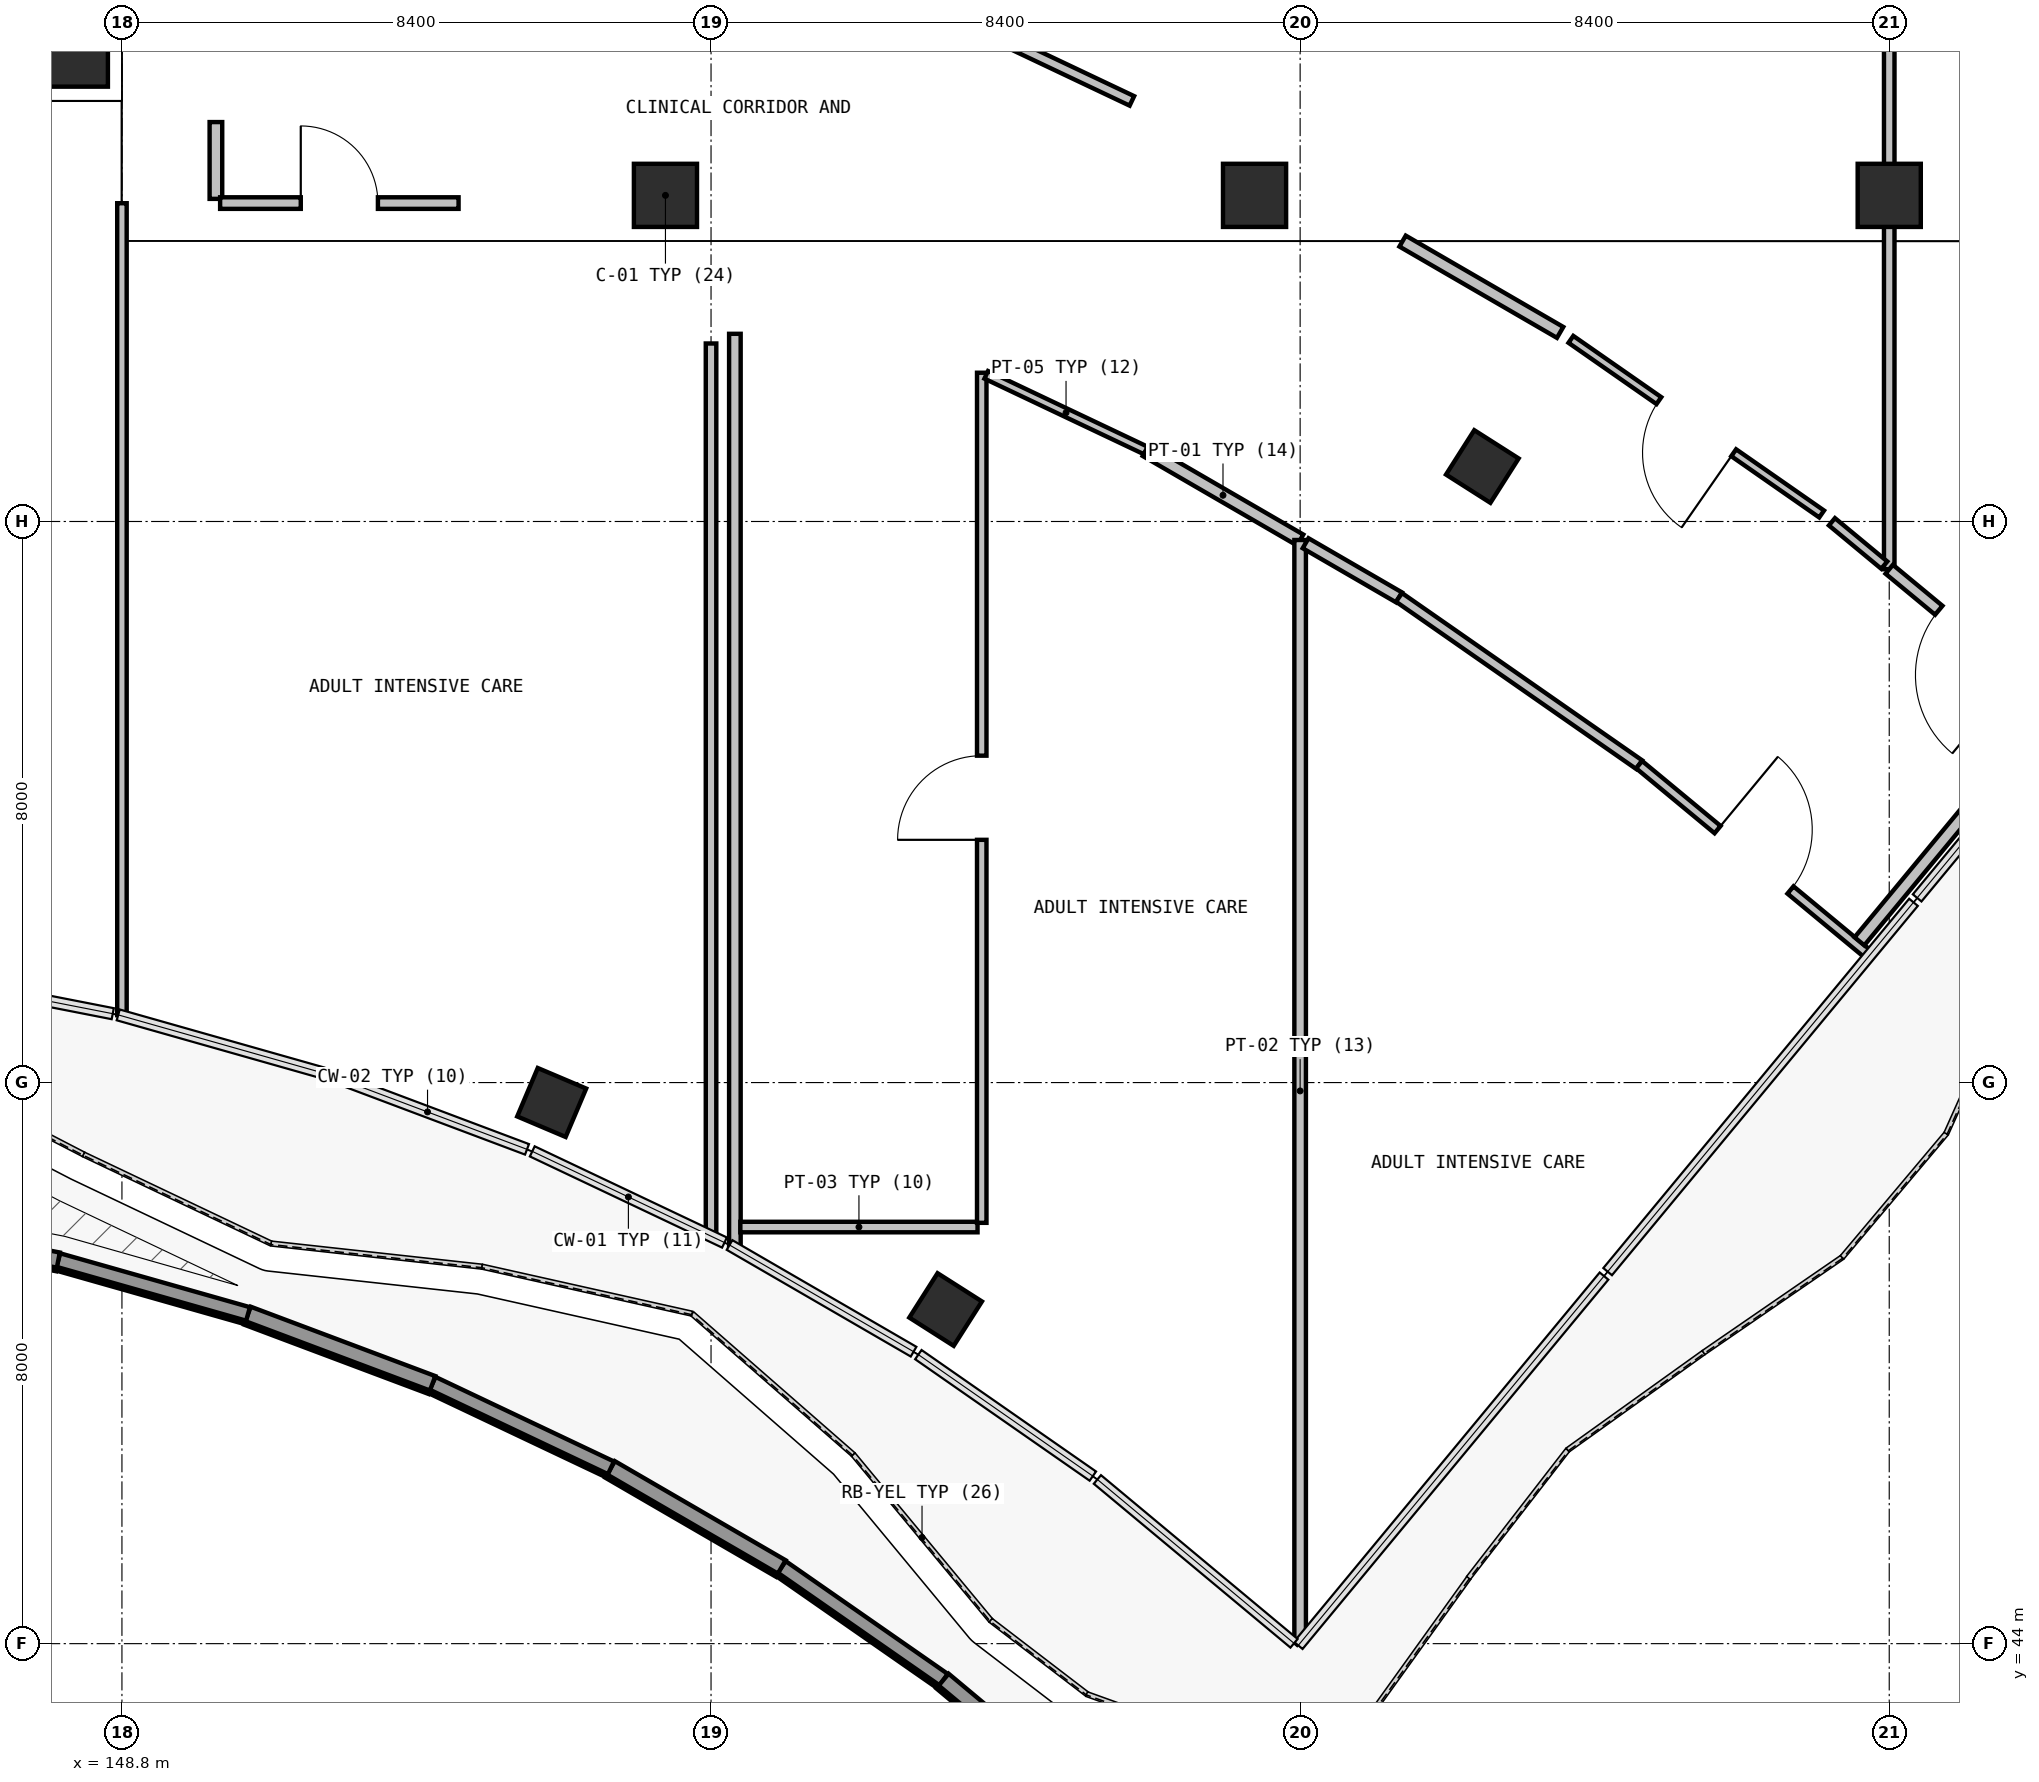
"""IFC4 building model, lengths in metres.
Left out: names, types, materials, properties, quantities, classifications, styles, units other than length and angle.
Written with IfcOpenShell. Run it as: python <this file> out.ifc"""

import sys

from ifc_helpers import new_model, si_unit, direction, frame, frame_2d, origin, origin_2d, place, context, subcontext, project, spatial, rectangle, extrude, element, fill, save


model = new_model("IFC4")
c1 = context("Model", 3, precision=1e-05, world=origin(), true_north=direction((0.0, 1.0)))
c2 = subcontext(c1, "Body", "Model", "MODEL_VIEW")
j1 = project(units=[si_unit("LENGTHUNIT", "METRE"), si_unit("PLANEANGLEUNIT", "RADIAN")], contexts=[c1])
p1 = place(None, origin())
s1 = spatial("IfcSite", under=j1, at=p1, CompositionType="ELEMENT")
p2 = place(p1, origin())
s2 = spatial("IfcBuilding", under=s1, at=p2, CompositionType="ELEMENT")
p3 = place(p2, frame((0.0, 0.0, 5.4)))
s3 = spatial("IfcBuildingStorey", under=s2, at=p3, CompositionType="ELEMENT", Elevation=5.4)
for number, where, z_axis, x_axis in (
    (1, (148.15, 66.65, 0.0), (0.0, 0.0, 1.0), (1.0, 0.0, 0.0)),
    (2, (156.55, 64.65, 0.0), (0.0, 0.0, 1.0), (1.0, 0.0, 0.0)),
    (3, (164.95, 64.65, 0.0), (0.0, 0.0, 1.0), (1.0, 0.0, 0.0)),
    (4, (174.0, 64.65, 0.0), (0.0, 0.0, 1.0), (1.0, 0.0, 0.0)),
):
    element("IfcColumn", number, at=place(p3, frame(where, z_axis=z_axis, x_axis=x_axis)), inside=s3, PredefinedType="COLUMN", context=c2, shape_type="SweptSolid", body=[
        extrude(rectangle(XDim=0.9, YDim=0.9, at=origin_2d()), origin(), (0.0, 0.0, 1.0), 4.8),
    ])
for number, where, z_axis, x_axis in (
    (5, (154.928, 51.716, 0.0), (0.0, 0.0, 1.0), (0.39, 0.921, 0.0)),
    (6, (168.198, 60.784, 0.0), (0.0, 0.0, 1.0), (0.537, 0.844, 0.0)),
    (7, (160.545, 48.764, 0.0), (0.0, 0.0, 1.0), (0.537, 0.844, 0.0)),
):
    element("IfcColumn", number, at=place(p3, frame(where, z_axis=z_axis, x_axis=x_axis)), inside=s3, PredefinedType="COLUMN", context=c2, shape_type="SweptSolid", body=[
        extrude(rectangle(XDim=0.75, YDim=0.75, at=origin_2d()), origin(), (0.0, 0.0, 1.0), 4.8),
    ])
p4 = place(p3, frame((160.517, 43.487, -0.08), z_axis=(0.0, 0.0, 1.0), x_axis=(-0.820802595538, 0.571211956421, 0.0)))
e8 = element("IfcWall", 8, at=p4, inside=s3, PredefinedType="PARAPET", context=c2, shape_type="SweptSolid", body=[
    extrude(rectangle(XDim=2.813, YDim=0.2, at=frame_2d((1.407, 0.0))), origin(), (0.0, 0.0, 1.0), 1.15),
])
p5 = place(p3, frame((158.208, 45.094, -0.08), z_axis=(0.0, 0.0, 1.0), x_axis=(-0.864915249361, 0.501917932956, 0.0)))
e9 = element("IfcWall", 9, at=p5, inside=s3, PredefinedType="PARAPET", context=c2, shape_type="SweptSolid", body=[
    extrude(rectangle(XDim=2.815, YDim=0.22, at=frame_2d((1.408, 0.0))), origin(), (0.0, 0.0, 1.0), 1.15),
])
p6 = place(p3, frame((155.773, 46.507, -0.08), z_axis=(0.0, 0.0, 1.0), x_axis=(-0.903700736415, 0.428164663422, 0.0)))
e10 = element("IfcWall", 10, at=p6, inside=s3, PredefinedType="PARAPET", context=c2, shape_type="SweptSolid", body=[
    extrude(rectangle(XDim=2.814, YDim=0.2, at=frame_2d((1.407, 0.0))), origin(), (0.0, 0.0, 1.0), 1.15),
])
p7 = place(p3, frame((153.23, 47.712, -0.08), z_axis=(0.0, 0.0, 1.0), x_axis=(-0.936097034399, 0.35174186869, 0.0)))
e11 = element("IfcWall", 11, at=p7, inside=s3, PredefinedType="PARAPET", context=c2, shape_type="SweptSolid", body=[
    extrude(rectangle(XDim=2.812, YDim=0.22, at=frame_2d((1.406, 0.0))), origin(), (0.0, 0.0, 1.0), 1.15),
])
p8 = place(p3, frame((150.598, 48.701, -0.08), z_axis=(0.0, 0.0, 1.0), x_axis=(-0.961968291007, 0.273161137603, 0.0)))
e12 = element("IfcWall", 12, at=p8, inside=s3, PredefinedType="PARAPET", context=c2, shape_type="SweptSolid", body=[
    extrude(rectangle(XDim=2.812, YDim=0.2, at=frame_2d((1.406, 0.0))), origin(), (0.0, 0.0, 1.0), 1.15),
])
p9 = place(p3, frame((147.893, 49.469, -0.08), z_axis=(0.0, 0.0, 1.0), x_axis=(-0.981415747177, 0.191893541302, 0.0)))
e13 = element("IfcWall", 13, at=p9, inside=s3, PredefinedType="PARAPET", context=c2, shape_type="SweptSolid", body=[
    extrude(rectangle(XDim=2.814, YDim=0.22, at=frame_2d((1.407, 0.0))), origin(), (0.0, 0.0, 1.0), 1.15),
])
p10 = place(p3, frame((163.183, 41.258, -0.08), z_axis=(0.0, 0.0, 1.0), x_axis=(-0.76718372461, 0.641427418103, 0.0)))
e14 = element("IfcWall", 14, at=p10, inside=s3, PredefinedType="PARAPET", context=c2, shape_type="SweptSolid", body=[
    extrude(rectangle(XDim=3.475, YDim=0.22, at=frame_2d((1.738, 0.0))), origin(), (0.0, 0.0, 1.0), 1.15),
])
p11 = place(p3, frame((148.8, 64.538, 0.0), z_axis=(0.0, 0.0, 1.0), x_axis=(0.0, -1.0, 0.0)))
e15 = element("IfcWall", 15, at=p11, inside=s3, PredefinedType="PARTITIONING", context=c2, shape_type="SweptSolid", body=[
    extrude(rectangle(XDim=11.577, YDim=0.135, at=frame_2d((5.789, 0.0))), origin(), (0.0, 0.0, 1.0), 4.445),
])
p12 = place(p3, frame((150.14, 65.695, 0.0), z_axis=(0.0, 0.0, 1.0), x_axis=(0.0, -1.0, 0.0)))
e16 = element("IfcWall", 16, at=p12, inside=s3, PredefinedType="PARTITIONING", context=c2, shape_type="SweptSolid", body=[
    extrude(rectangle(XDim=1.095, YDim=0.18, at=frame_2d((0.547, 0.0))), origin(), (0.0, 0.0, 1.0), 4.445),
])
p13 = place(p3, frame((150.2, 64.54, 0.0), z_axis=(0.0, 0.0, 1.0), x_axis=(1.0, 0.0, 0.0)))
e17 = element("IfcWall", 17, at=p13, inside=s3, PredefinedType="PARTITIONING", context=c2, shape_type="SweptSolid", body=[
    extrude(rectangle(XDim=3.4, YDim=0.165, at=frame_2d((1.7, 0.0))), origin(), (0.0, 0.0, 1.0), 4.445),
])
p14 = place(p13, frame((1.15, 0.0, 0.0)))
e18 = element("IfcOpeningElement", 18, at=p14, cuts=e17, PredefinedType="OPENING", context=c2, shape_type="SweptSolid", body=[
    extrude(rectangle(XDim=1.1, YDim=2.15, at=frame_2d((0.55, 1.075))), frame((0.0, 0.093, 0.0), z_axis=(0.0, -1.0, 0.0), x_axis=(1.0, 0.0, 0.0)), (0.0, 0.0, 1.0), 0.185),
])
p15 = place(p3, frame((157.2, 62.538, 0.0), z_axis=(0.0, 0.0, 1.0), x_axis=(0.0, -1.0, 0.0)))
e19 = element("IfcWall", 19, at=p15, inside=s3, PredefinedType="PARTITIONING", context=c2, shape_type="SweptSolid", body=[
    extrude(rectangle(XDim=12.715, YDim=0.15, at=frame_2d((6.357, 0.0))), origin(), (0.0, 0.0, 1.0), 4.445),
])
p16 = place(p3, frame((157.54, 62.676, 0.0), z_axis=(0.0, 0.0, 1.0), x_axis=(0.0, -1.0, 0.0)))
e20 = element("IfcWall", 20, at=p16, inside=s3, PredefinedType="PARTITIONING", context=c2, shape_type="SweptSolid", body=[
    extrude(rectangle(XDim=13.023, YDim=0.165, at=frame_2d((6.511, 0.0))), origin(), (0.0, 0.0, 1.0), 4.445),
])
p17 = place(p3, frame((157.618, 49.94, 0.0), z_axis=(0.0, 0.0, 1.0), x_axis=(1.0, 0.0, 0.0)))
e21 = element("IfcWall", 21, at=p17, inside=s3, PredefinedType="PARTITIONING", context=c2, shape_type="SweptSolid", body=[
    extrude(rectangle(XDim=3.382, YDim=0.15, at=frame_2d((1.691, 0.0))), origin(), (0.0, 0.0, 1.0), 4.445),
])
p18 = place(p3, frame((161.06, 50.0, 0.0), z_axis=(0.0, 0.0, 1.0), x_axis=(0.0, 1.0, 0.0)))
e22 = element("IfcWall", 22, at=p18, inside=s3, PredefinedType="PARTITIONING", context=c2, shape_type="SweptSolid", body=[
    extrude(rectangle(XDim=12.121, YDim=0.135, at=frame_2d((6.061, 0.0))), origin(), (0.0, 0.0, 1.0), 4.445),
])
p19 = place(p18, frame((5.461, 0.0, 0.0)))
e23 = element("IfcOpeningElement", 23, at=p19, cuts=e22, PredefinedType="OPENING", context=c2, shape_type="SweptSolid", body=[
    extrude(rectangle(XDim=1.2, YDim=2.15, at=frame_2d((0.6, 1.075))), frame((0.0, 0.077, 0.0), z_axis=(0.0, -1.0, 0.0), x_axis=(1.0, 0.0, 0.0)), (0.0, 0.0, 1.0), 0.155),
])
p20 = place(p3, frame((161.124, 62.091, 0.0), z_axis=(0.0, 0.0, 1.0), x_axis=(0.903575932901, -0.428427979341, 0.0)))
e24 = element("IfcWall", 24, at=p20, inside=s3, PredefinedType="PARTITIONING", context=c2, shape_type="SweptSolid", body=[
    extrude(rectangle(XDim=2.519, YDim=0.12, at=frame_2d((1.259, 0.0))), origin(), (0.0, 0.0, 1.0), 4.445),
])
p21 = place(p3, frame((163.4, 61.012, 0.0), z_axis=(0.0, 0.0, 1.0), x_axis=(0.865071180383, -0.501649133231, 0.0)))
e25 = element("IfcWall", 25, at=p21, inside=s3, PredefinedType="PARTITIONING", context=c2, shape_type="SweptSolid", body=[
    extrude(rectangle(XDim=2.543, YDim=0.18, at=frame_2d((1.272, 0.0))), origin(), (0.0, 0.0, 1.0), 4.445),
])
p22 = place(p3, frame((165.6, 59.736, 0.0), z_axis=(0.0, 0.0, 1.0), x_axis=(0.0, -1.0, 0.0)))
e26 = element("IfcWall", 26, at=p22, inside=s3, PredefinedType="PARTITIONING", context=c2, shape_type="SweptSolid", body=[
    extrude(rectangle(XDim=15.71, YDim=0.165, at=frame_2d((7.855, 0.0))), origin(), (0.0, 0.0, 1.0), 4.445),
])
p23 = place(p3, frame((163.201, 65.997, 0.0), z_axis=(0.0, 0.0, 1.0), x_axis=(-0.903658874167, 0.428253008325, 0.0)))
e27 = element("IfcWall", 27, at=p23, inside=s3, PredefinedType="PARTITIONING", context=c2, shape_type="SweptSolid", body=[
    extrude(rectangle(XDim=1.952, YDim=0.15, at=frame_2d((0.976, 0.0))), origin(), (0.0, 0.0, 1.0), 4.445),
])
p24 = place(p3, frame((165.678, 59.69, 0.0), z_axis=(0.0, 0.0, 1.0), x_axis=(0.865201820635, -0.501423782413, 0.0)))
e28 = element("IfcWall", 28, at=p24, inside=s3, PredefinedType="PARTITIONING", context=c2, shape_type="SweptSolid", body=[
    extrude(rectangle(XDim=1.54, YDim=0.165, at=frame_2d((0.77, 0.0))), origin(), (0.0, 0.0, 1.0), 4.445),
])
p25 = place(p3, frame((167.01, 58.918, 0.0), z_axis=(0.0, 0.0, 1.0), x_axis=(0.820562806153, -0.571556367437, 0.0)))
e29 = element("IfcWall", 29, at=p25, inside=s3, PredefinedType="PARTITIONING", context=c2, shape_type="SweptSolid", body=[
    extrude(rectangle(XDim=4.173, YDim=0.15, at=frame_2d((2.086, 0.0))), origin(), (0.0, 0.0, 1.0), 4.445),
])
p26 = place(p3, frame((170.434, 56.533, 0.0), z_axis=(0.0, 0.0, 1.0), x_axis=(0.770184287696, -0.637821419353, 0.0)))
e30 = element("IfcWall", 30, at=p26, inside=s3, PredefinedType="PARTITIONING", context=c2, shape_type="SweptSolid", body=[
    extrude(rectangle(XDim=4.253, YDim=0.135, at=frame_2d((2.127, 0.0))), origin(), (0.0, 0.0, 1.0), 4.445),
])
p27 = place(p26, frame((1.452, 0.0, 0.0)))
e31 = element("IfcOpeningElement", 31, at=p27, cuts=e30, PredefinedType="OPENING", context=c2, shape_type="SweptSolid", body=[
    extrude(rectangle(XDim=1.35, YDim=2.15, at=frame_2d((0.675, 1.075))), frame((0.0, 0.077, 0.0), z_axis=(0.0, -1.0, 0.0), x_axis=(1.0, 0.0, 0.0)), (0.0, 0.0, 1.0), 0.155),
])
p28 = place(p3, frame((173.036, 60.107, 0.0), z_axis=(0.0, 0.0, 1.0), x_axis=(-0.820574971601, 0.571538901547, 0.0)))
e32 = element("IfcWall", 32, at=p28, inside=s3, PredefinedType="PARTITIONING", context=c2, shape_type="SweptSolid", body=[
    extrude(rectangle(XDim=4.357, YDim=0.12, at=frame_2d((2.178, 0.0))), origin(), (0.0, 0.0, 1.0), 4.445),
])
p29 = place(p28, frame((1.528, 0.0, 0.0)))
e33 = element("IfcOpeningElement", 33, at=p29, cuts=e32, PredefinedType="OPENING", context=c2, shape_type="SweptSolid", body=[
    extrude(rectangle(XDim=1.3, YDim=2.15, at=frame_2d((0.65, 1.075))), frame((0.0, 0.07, 0.0), z_axis=(0.0, -1.0, 0.0), x_axis=(1.0, 0.0, 0.0)), (0.0, 0.0, 1.0), 0.14),
])
p30 = place(p3, frame((169.307, 62.696, 0.0), z_axis=(0.0, 0.0, 1.0), x_axis=(-0.86512994763, 0.501547778097, 0.0)))
e34 = element("IfcWall", 34, at=p30, inside=s3, PredefinedType="PARTITIONING", context=c2, shape_type="SweptSolid", body=[
    extrude(rectangle(XDim=2.596, YDim=0.18, at=frame_2d((1.298, 0.0))), origin(), (0.0, 0.0, 1.0), 4.445),
])
p31 = place(p3, frame((174.0, 77.521, 0.0), z_axis=(0.0, 0.0, 1.0), x_axis=(0.0, -1.0, 0.0)))
e35 = element("IfcWall", 35, at=p31, inside=s3, PredefinedType="PARTITIONING", context=c2, shape_type="SweptSolid", body=[
    extrude(rectangle(XDim=18.202, YDim=0.15, at=frame_2d((9.101, 0.0))), origin(), (0.0, 0.0, 1.0), 3.695),
])
p32 = place(p3, frame((173.929, 59.378, 0.0), z_axis=(0.0, 0.0, 1.0), x_axis=(-0.769933113357, 0.638124596733, 0.0)))
e36 = element("IfcWall", 36, at=p32, inside=s3, PredefinedType="PARTITIONING", context=c2, shape_type="SweptSolid", body=[
    extrude(rectangle(XDim=0.969, YDim=0.135, at=frame_2d((0.484, 0.0))), origin(), (0.0, 0.0, 1.0), 4.445),
])
p33 = place(p3, frame((173.575, 54.014, 0.0), z_axis=(0.0, 0.0, 1.0), x_axis=(0.637654919924, 0.770322142416, 0.0)))
e37 = element("IfcWall", 37, at=p33, inside=s3, PredefinedType="PARTITIONING", context=c2, shape_type="SweptSolid", body=[
    extrude(rectangle(XDim=4.297, YDim=0.18, at=frame_2d((2.148, 0.0))), origin(), (0.0, 0.0, 1.0), 4.445),
])
p34 = place(p3, frame((176.53, 57.225, 0.0), z_axis=(0.0, 0.0, 1.0), x_axis=(-0.770367879737, 0.637599662695, 0.0)))
e38 = element("IfcWall", 38, at=p34, inside=s3, PredefinedType="PARTITIONING", context=c2, shape_type="SweptSolid", body=[
    extrude(rectangle(XDim=3.284, YDim=0.165, at=frame_2d((1.642, 0.0))), origin(), (0.0, 0.0, 1.0), 4.445),
])
p35 = place(p34, frame((0.917, 0.0, 0.0)))
e39 = element("IfcOpeningElement", 39, at=p35, cuts=e38, PredefinedType="OPENING", context=c2, shape_type="SweptSolid", body=[
    extrude(rectangle(XDim=1.45, YDim=2.15, at=frame_2d((0.725, 1.075))), frame((0.0, 0.093, 0.0), z_axis=(0.0, -1.0, 0.0), x_axis=(1.0, 0.0, 0.0)), (0.0, 0.0, 1.0), 0.185),
])
p36 = place(p14, origin())
e40 = element("IfcDoor", 40, at=p36, inside=s3, OperationType="SINGLE_SWING_LEFT", PredefinedType="DOOR", context=c2, shape_type="SweptSolid", body=[
    extrude(rectangle(XDim=1.1, YDim=2.15, at=frame_2d((0.55, 1.075))), frame((0.0, 0.025, 0.0), z_axis=(0.0, -1.0, 0.0), x_axis=(1.0, 0.0, 0.0)), (0.0, 0.0, 1.0), 0.05),
])
fill(e18, e40)
p37 = place(p19, origin())
e41 = element("IfcDoor", 41, at=p37, inside=s3, OperationType="SINGLE_SWING_LEFT", PredefinedType="DOOR", context=c2, shape_type="SweptSolid", body=[
    extrude(rectangle(XDim=1.2, YDim=2.15, at=frame_2d((0.6, 1.075))), frame((0.0, 0.025, 0.0), z_axis=(0.0, -1.0, 0.0), x_axis=(1.0, 0.0, 0.0)), (0.0, 0.0, 1.0), 0.05),
])
fill(e23, e41)
p38 = place(p27, origin())
e42 = element("IfcDoor", 42, at=p38, inside=s3, OperationType="SINGLE_SWING_LEFT", PredefinedType="DOOR", context=c2, shape_type="SweptSolid", body=[
    extrude(rectangle(XDim=1.35, YDim=2.15, at=frame_2d((0.675, 1.075))), frame((0.0, 0.025, 0.0), z_axis=(0.0, -1.0, 0.0), x_axis=(1.0, 0.0, 0.0)), (0.0, 0.0, 1.0), 0.05),
])
fill(e31, e42)
p39 = place(p29, origin())
e43 = element("IfcDoor", 43, at=p39, inside=s3, OperationType="SINGLE_SWING_RIGHT", PredefinedType="DOOR", context=c2, shape_type="SweptSolid", body=[
    extrude(rectangle(XDim=1.3, YDim=2.15, at=frame_2d((0.65, 1.075))), frame((0.0, 0.025, 0.0), z_axis=(0.0, -1.0, 0.0), x_axis=(1.0, 0.0, 0.0)), (0.0, 0.0, 1.0), 0.05),
])
fill(e33, e43)
p40 = place(p35, origin())
e44 = element("IfcDoor", 44, at=p40, inside=s3, OperationType="SINGLE_SWING_LEFT", PredefinedType="DOOR", context=c2, shape_type="SweptSolid", body=[
    extrude(rectangle(XDim=1.45, YDim=2.15, at=frame_2d((0.725, 1.075))), frame((0.0, 0.025, 0.0), z_axis=(0.0, -1.0, 0.0), x_axis=(1.0, 0.0, 0.0)), (0.0, 0.0, 1.0), 0.05),
])
fill(e39, e44)
save(model, sys.argv[1])
